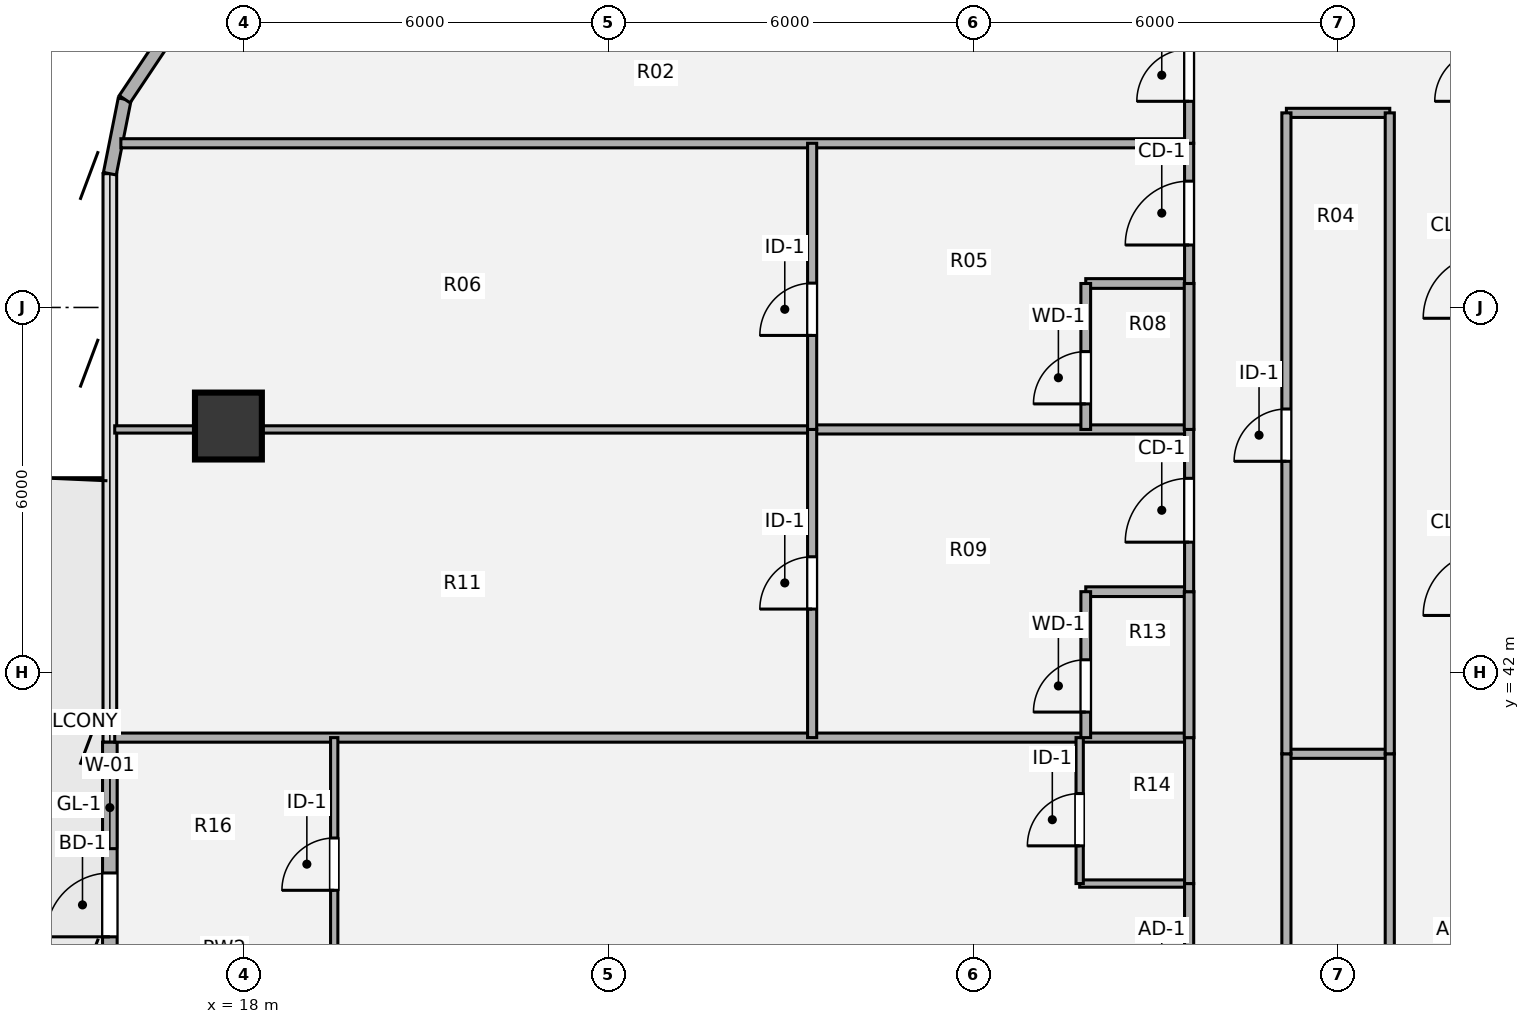
"""IFC4 building model, lengths in metres.
Left out: names, types, materials, properties, quantities, classifications, styles, units other than length and angle.
Written with IfcOpenShell. Run it as: python <this file> out.ifc"""

import sys

from ifc_helpers import new_model, si_unit, direction, frame, frame_2d, origin, origin_2d, place, context, subcontext, project, spatial, rectangle, hollow_circle, extrude, source, transform, mapped, element, fill, save


model = new_model("IFC4")
c1 = context("Model", 3, precision=1e-05, world=origin(), true_north=direction((0.0, 1.0)))
c2 = subcontext(c1, "Body", "Model", "MODEL_VIEW")
j1 = project(units=[si_unit("LENGTHUNIT", "METRE"), si_unit("PLANEANGLEUNIT", "RADIAN")], contexts=[c1])
p1 = place(None, origin())
s1 = spatial("IfcSite", under=j1, at=p1, CompositionType="ELEMENT")
p2 = place(p1, origin())
s2 = spatial("IfcBuilding", under=s1, at=p2, CompositionType="ELEMENT")
p3 = place(p2, frame((0.0, 0.0, 205.56)))
s3 = spatial("IfcBuildingStorey", under=s2, at=p3, CompositionType="ELEMENT", Elevation=205.56)
m1 = source(origin(), c2, "Body", "SweptSolid", [
    extrude(hollow_circle(Radius=0.55, WallThickness=0.04, at=origin_2d()), origin(), (0.0, 0.0, 1.0), 3.78),
])
p4 = place(p3, frame((17.75, 46.05, 0.0), z_axis=(0.0, 0.0, 1.0), x_axis=(1.0, 0.0, 0.0)))
e1 = element("IfcColumn", 1, at=p4, inside=s3, PredefinedType="COLUMN", context=c2, shape_type="MappedRepresentation", body=[
    mapped(m1, transform((0.0, 0.0, 0.0), x_axis=(1.0, 0.0, 0.0), y_axis=(0.0, 1.0, 0.0), z_axis=(0.0, 0.0, 1.0), scale=1.0)),
])
p5 = place(p3, frame((15.8, 37.25, 0.0), z_axis=(0.0, 0.0, 1.0), x_axis=(0.0, 1.0, 0.0)))
e2 = element("IfcWall", 2, at=p5, inside=s3, PredefinedType="SOLIDWALL", context=c2, shape_type="SweptSolid", body=[
    extrude(rectangle(XDim=3.6, YDim=0.24, at=frame_2d((1.8, 0.0))), origin(), (0.0, 0.0, 1.0), 3.53),
])
p6 = place(p5, frame((0.4, 0.0, 0.0)))
e3 = element("IfcOpeningElement", 3, at=p6, cuts=e2, PredefinedType="OPENING", context=c2, shape_type="SweptSolid", body=[
    extrude(rectangle(XDim=1.05, YDim=2.15, at=origin_2d()), frame((0.525, 0.13, 1.075), z_axis=(0.0, -1.0, 0.0), x_axis=(1.0, 0.0, 0.0)), (0.0, 0.0, 1.0), 0.26),
])
p7 = place(p5, frame((1.85, 0.0, 0.85)))
e4 = element("IfcOpeningElement", 4, at=p7, cuts=e2, PredefinedType="OPENING", context=c2, shape_type="SweptSolid", body=[
    extrude(rectangle(XDim=1.35, YDim=1.35, at=origin_2d()), frame((0.675, 0.13, 0.675), z_axis=(0.0, -1.0, 0.0), x_axis=(1.0, 0.0, 0.0)), (0.0, 0.0, 1.0), 0.26),
])
for number, where, z_axis, x_axis in (
    (5, (15.8, 50.2, 0.0), (0.0, 0.0, 1.0), (0.195, 0.981, 0.0)),
    (6, (16.044, 51.425, 0.0), (0.0, 0.0, 1.0), (0.556, 0.831, 0.0)),
):
    element("IfcWall", number, at=place(p3, frame(where, z_axis=z_axis, x_axis=x_axis)), inside=s3, PredefinedType="SOLIDWALL", context=c2, shape_type="SweptSolid", body=[
        extrude(rectangle(XDim=1.249, YDim=0.215, at=frame_2d((0.624, 0.0))), origin(), (0.0, 0.0, 1.0), 3.53),
    ])
p8 = place(p3, frame((31.75, 38.526, 0.0), z_axis=(0.0, 0.0, 1.0), x_axis=(1.0, 0.0, 0.0)))
e7 = element("IfcWall", 7, at=p8, inside=s3, PredefinedType="PARTITIONING", context=c2, shape_type="SweptSolid", body=[
    extrude(rectangle(XDim=1.8, YDim=0.12, at=frame_2d((0.9, 0.0))), origin(), (0.0, 0.0, 1.0), 3.259),
])
p9 = place(p3, frame((35.15, 40.66, 0.0), z_axis=(0.0, 0.0, 1.0), x_axis=(1.0, 0.0, 0.0)))
e8 = element("IfcWall", 8, at=p9, inside=s3, PredefinedType="PARTITIONING", context=c2, shape_type="SweptSolid", body=[
    extrude(rectangle(XDim=1.7, YDim=0.15, at=frame_2d((0.85, 0.0))), origin(), (0.0, 0.0, 1.0), 3.259),
])
p10 = place(p3, frame((15.88, 40.926, 0.0), z_axis=(0.0, 0.0, 1.0), x_axis=(1.0, 0.0, 0.0)))
e9 = element("IfcWall", 9, at=p10, inside=s3, PredefinedType="PARTITIONING", context=c2, shape_type="SweptSolid", body=[
    extrude(rectangle(XDim=17.67, YDim=0.15, at=frame_2d((8.835, 0.0))), origin(), (0.0, 0.0, 1.0), 2.982),
])
p11 = place(p3, frame((31.85, 43.326, 0.0), z_axis=(0.0, 0.0, 1.0), x_axis=(1.0, 0.0, 0.0)))
e10 = element("IfcWall", 10, at=p11, inside=s3, PredefinedType="PLUMBINGWALL", context=c2, shape_type="SweptSolid", body=[
    extrude(rectangle(XDim=1.7, YDim=0.16, at=frame_2d((0.85, 0.0))), origin(), (0.0, 0.0, 1.0), 3.259),
])
p12 = place(p3, frame((15.88, 45.994, 0.0), z_axis=(0.0, 0.0, 1.0), x_axis=(1.0, 0.0, 0.0)))
e11 = element("IfcWall", 11, at=p12, inside=s3, PredefinedType="PARTITIONING", context=c2, shape_type="SweptSolid", body=[
    extrude(rectangle(XDim=11.47, YDim=0.12, at=frame_2d((5.735, 0.0))), origin(), (0.0, 0.0, 1.0), 2.903),
])
p13 = place(p3, frame((27.35, 45.994, 0.0), z_axis=(0.0, 0.0, 1.0), x_axis=(1.0, 0.0, 0.0)))
e12 = element("IfcWall", 12, at=p13, inside=s3, PredefinedType="PARTITIONING", context=c2, shape_type="SweptSolid", body=[
    extrude(rectangle(XDim=6.2, YDim=0.15, at=frame_2d((3.1, 0.0))), origin(), (0.0, 0.0, 1.0), 2.903),
])
p14 = place(p3, frame((31.85, 48.394, 0.0), z_axis=(0.0, 0.0, 1.0), x_axis=(1.0, 0.0, 0.0)))
e13 = element("IfcWall", 13, at=p14, inside=s3, PredefinedType="PLUMBINGWALL", context=c2, shape_type="SweptSolid", body=[
    extrude(rectangle(XDim=1.7, YDim=0.16, at=frame_2d((0.85, 0.0))), origin(), (0.0, 0.0, 1.0), 3.259),
])
p15 = place(p3, frame((15.981, 50.7, 0.0), z_axis=(0.0, 0.0, 1.0), x_axis=(1.0, 0.0, 0.0)))
e14 = element("IfcWall", 14, at=p15, inside=s3, PredefinedType="PARTITIONING", context=c2, shape_type="SweptSolid", body=[
    extrude(rectangle(XDim=17.569, YDim=0.15, at=frame_2d((8.785, 0.0))), origin(), (0.0, 0.0, 1.0), 3.308),
])
p16 = place(p3, frame((35.15, 51.2, 0.0), z_axis=(0.0, 0.0, 1.0), x_axis=(1.0, 0.0, 0.0)))
e15 = element("IfcWall", 15, at=p16, inside=s3, PredefinedType="PARTITIONING", context=c2, shape_type="SweptSolid", body=[
    extrude(rectangle(XDim=1.7, YDim=0.15, at=frame_2d((0.85, 0.0))), origin(), (0.0, 0.0, 1.0), 3.308),
])
p17 = place(p3, frame((19.49, 36.763, 0.0), z_axis=(0.0, 0.0, 1.0), x_axis=(0.0, 1.0, 0.0)))
e16 = element("IfcWall", 16, at=p17, inside=s3, PredefinedType="PARTITIONING", context=c2, shape_type="SweptSolid", body=[
    extrude(rectangle(XDim=4.163, YDim=0.12, at=frame_2d((2.082, 0.0))), origin(), (0.0, 0.0, 1.0), 3.5),
])
p18 = place(p17, frame((1.652, 0.0, 0.0)))
e17 = element("IfcOpeningElement", 17, at=p18, cuts=e16, PredefinedType="OPENING", context=c2, shape_type="SweptSolid", body=[
    extrude(rectangle(XDim=0.86, YDim=2.1, at=origin_2d()), frame((0.43, 0.07, 1.05), z_axis=(0.0, -1.0, 0.0), x_axis=(1.0, 0.0, 0.0)), (0.0, 0.0, 1.0), 0.14),
])
p19 = place(p3, frame((27.35, 40.926, 0.0), z_axis=(0.0, 0.0, 1.0), x_axis=(0.0, 1.0, 0.0)))
e18 = element("IfcWall", 18, at=p19, inside=s3, PredefinedType="PARTITIONING", context=c2, shape_type="SweptSolid", body=[
    extrude(rectangle(XDim=5.068, YDim=0.15, at=frame_2d((2.534, 0.0))), origin(), (0.0, 0.0, 1.0), 3.5),
])
p20 = place(p19, frame((2.114, 0.0, 0.0)))
e19 = element("IfcOpeningElement", 19, at=p20, cuts=e18, PredefinedType="OPENING", context=c2, shape_type="SweptSolid", body=[
    extrude(rectangle(XDim=0.86, YDim=2.1, at=origin_2d()), frame((0.43, 0.085, 1.05), z_axis=(0.0, -1.0, 0.0), x_axis=(1.0, 0.0, 0.0)), (0.0, 0.0, 1.0), 0.17),
])
p21 = place(p3, frame((27.35, 45.994, 0.0), z_axis=(0.0, 0.0, 1.0), x_axis=(0.0, 1.0, 0.0)))
e20 = element("IfcWall", 20, at=p21, inside=s3, PredefinedType="PARTITIONING", context=c2, shape_type="SweptSolid", body=[
    extrude(rectangle(XDim=4.706, YDim=0.15, at=frame_2d((2.353, 0.0))), origin(), (0.0, 0.0, 1.0), 3.5),
])
p22 = place(p21, frame((1.546, 0.0, 0.0)))
e21 = element("IfcOpeningElement", 21, at=p22, cuts=e20, PredefinedType="OPENING", context=c2, shape_type="SweptSolid", body=[
    extrude(rectangle(XDim=0.86, YDim=2.1, at=origin_2d()), frame((0.43, 0.085, 1.05), z_axis=(0.0, -1.0, 0.0), x_axis=(1.0, 0.0, 0.0)), (0.0, 0.0, 1.0), 0.17),
])
p23 = place(p3, frame((31.75, 38.526, 0.0), z_axis=(0.0, 0.0, 1.0), x_axis=(0.0, 1.0, 0.0)))
e22 = element("IfcWall", 22, at=p23, inside=s3, PredefinedType="PARTITIONING", context=c2, shape_type="SweptSolid", body=[
    extrude(rectangle(XDim=2.4, YDim=0.12, at=frame_2d((1.2, 0.0))), origin(), (0.0, 0.0, 1.0), 3.5),
])
p24 = place(p23, frame((0.62, 0.0, 0.0)))
e23 = element("IfcOpeningElement", 23, at=p24, cuts=e22, PredefinedType="OPENING", context=c2, shape_type="SweptSolid", body=[
    extrude(rectangle(XDim=0.86, YDim=2.1, at=origin_2d()), frame((0.43, 0.07, 1.05), z_axis=(0.0, -1.0, 0.0), x_axis=(1.0, 0.0, 0.0)), (0.0, 0.0, 1.0), 0.14),
])
p25 = place(p3, frame((31.85, 40.926, 0.0), z_axis=(0.0, 0.0, 1.0), x_axis=(0.0, 1.0, 0.0)))
e24 = element("IfcWall", 24, at=p25, inside=s3, PredefinedType="PLUMBINGWALL", context=c2, shape_type="SweptSolid", body=[
    extrude(rectangle(XDim=2.4, YDim=0.16, at=frame_2d((1.2, 0.0))), origin(), (0.0, 0.0, 1.0), 3.5),
])
p26 = place(p25, frame((0.42, 0.0, 0.0)))
e25 = element("IfcOpeningElement", 25, at=p26, cuts=e24, PredefinedType="OPENING", context=c2, shape_type="SweptSolid", body=[
    extrude(rectangle(XDim=0.86, YDim=2.1, at=origin_2d()), frame((0.43, 0.09, 1.05), z_axis=(0.0, -1.0, 0.0), x_axis=(1.0, 0.0, 0.0)), (0.0, 0.0, 1.0), 0.18),
])
p27 = place(p3, frame((31.85, 45.994, 0.0), z_axis=(0.0, 0.0, 1.0), x_axis=(0.0, 1.0, 0.0)))
e26 = element("IfcWall", 26, at=p27, inside=s3, PredefinedType="PLUMBINGWALL", context=c2, shape_type="SweptSolid", body=[
    extrude(rectangle(XDim=2.4, YDim=0.16, at=frame_2d((1.2, 0.0))), origin(), (0.0, 0.0, 1.0), 3.5),
])
p28 = place(p27, frame((0.42, 0.0, 0.0)))
e27 = element("IfcOpeningElement", 27, at=p28, cuts=e26, PredefinedType="OPENING", context=c2, shape_type="SweptSolid", body=[
    extrude(rectangle(XDim=0.86, YDim=2.1, at=origin_2d()), frame((0.43, 0.09, 1.05), z_axis=(0.0, -1.0, 0.0), x_axis=(1.0, 0.0, 0.0)), (0.0, 0.0, 1.0), 0.18),
])
p29 = place(p3, frame((33.55, 35.0, 0.0), z_axis=(0.0, 0.0, 1.0), x_axis=(0.0, 1.0, 0.0)))
e28 = element("IfcWall", 28, at=p29, inside=s3, PredefinedType="PARTITIONING", context=c2, shape_type="SweptSolid", body=[
    extrude(rectangle(XDim=3.526, YDim=0.15, at=frame_2d((1.763, 0.0))), origin(), (0.0, 0.0, 1.0), 3.5),
])
p30 = place(p29, frame((1.303, 0.0, 0.0)))
e29 = element("IfcOpeningElement", 29, at=p30, cuts=e28, PredefinedType="OPENING", context=c2, shape_type="SweptSolid", body=[
    extrude(rectangle(XDim=0.92, YDim=2.1, at=origin_2d()), frame((0.46, 0.085, 1.05), z_axis=(0.0, -1.0, 0.0), x_axis=(1.0, 0.0, 0.0)), (0.0, 0.0, 1.0), 0.17),
])
p31 = place(p3, frame((33.55, 38.526, 0.0), z_axis=(0.0, 0.0, 1.0), x_axis=(0.0, 1.0, 0.0)))
e30 = element("IfcWall", 30, at=p31, inside=s3, PredefinedType="PARTITIONING", context=c2, shape_type="SweptSolid", body=[
    extrude(rectangle(XDim=2.4, YDim=0.15, at=frame_2d((1.2, 0.0))), origin(), (0.0, 0.0, 1.0), 3.5),
])
p32 = place(p3, frame((33.55, 40.926, 0.0), z_axis=(0.0, 0.0, 1.0), x_axis=(0.0, 1.0, 0.0)))
e31 = element("IfcWall", 31, at=p32, inside=s3, PredefinedType="PLUMBINGWALL", context=c2, shape_type="SweptSolid", body=[
    extrude(rectangle(XDim=2.4, YDim=0.16, at=frame_2d((1.2, 0.0))), origin(), (0.0, 0.0, 1.0), 3.5),
])
p33 = place(p3, frame((33.55, 43.326, 0.0), z_axis=(0.0, 0.0, 1.0), x_axis=(0.0, 1.0, 0.0)))
e32 = element("IfcWall", 32, at=p33, inside=s3, PredefinedType="PARTITIONING", context=c2, shape_type="SweptSolid", body=[
    extrude(rectangle(XDim=2.668, YDim=0.15, at=frame_2d((1.334, 0.0))), origin(), (0.0, 0.0, 1.0), 3.5),
])
p34 = place(p33, frame((0.814, 0.0, 0.0)))
e33 = element("IfcOpeningElement", 33, at=p34, cuts=e32, PredefinedType="OPENING", context=c2, shape_type="SweptSolid", body=[
    extrude(rectangle(XDim=1.05, YDim=2.1, at=origin_2d()), frame((0.525, 0.085, 1.05), z_axis=(0.0, -1.0, 0.0), x_axis=(1.0, 0.0, 0.0)), (0.0, 0.0, 1.0), 0.17),
])
p35 = place(p3, frame((33.55, 45.994, 0.0), z_axis=(0.0, 0.0, 1.0), x_axis=(0.0, 1.0, 0.0)))
e34 = element("IfcWall", 34, at=p35, inside=s3, PredefinedType="PLUMBINGWALL", context=c2, shape_type="SweptSolid", body=[
    extrude(rectangle(XDim=2.4, YDim=0.16, at=frame_2d((1.2, 0.0))), origin(), (0.0, 0.0, 1.0), 3.5),
])
p36 = place(p3, frame((33.55, 48.394, 0.0), z_axis=(0.0, 0.0, 1.0), x_axis=(0.0, 1.0, 0.0)))
e35 = element("IfcWall", 35, at=p36, inside=s3, PredefinedType="PARTITIONING", context=c2, shape_type="SweptSolid", body=[
    extrude(rectangle(XDim=2.306, YDim=0.15, at=frame_2d((1.153, 0.0))), origin(), (0.0, 0.0, 1.0), 3.5),
])
p37 = place(p36, frame((0.633, 0.0, 0.0)))
e36 = element("IfcOpeningElement", 36, at=p37, cuts=e35, PredefinedType="OPENING", context=c2, shape_type="SweptSolid", body=[
    extrude(rectangle(XDim=1.05, YDim=2.1, at=origin_2d()), frame((0.525, 0.085, 1.05), z_axis=(0.0, -1.0, 0.0), x_axis=(1.0, 0.0, 0.0)), (0.0, 0.0, 1.0), 0.17),
])
p38 = place(p3, frame((33.55, 50.7, 0.0), z_axis=(0.0, 0.0, 1.0), x_axis=(0.0, 1.0, 0.0)))
e37 = element("IfcWall", 37, at=p38, inside=s3, PredefinedType="PARTITIONING", context=c2, shape_type="SweptSolid", body=[
    extrude(rectangle(XDim=2.3, YDim=0.15, at=frame_2d((1.15, 0.0))), origin(), (0.0, 0.0, 1.0), 3.5),
])
p39 = place(p38, frame((0.69, 0.0, 0.0)))
e38 = element("IfcOpeningElement", 38, at=p39, cuts=e37, PredefinedType="OPENING", context=c2, shape_type="SweptSolid", body=[
    extrude(rectangle(XDim=0.86, YDim=2.1, at=origin_2d()), frame((0.43, 0.085, 1.05), z_axis=(0.0, -1.0, 0.0), x_axis=(1.0, 0.0, 0.0)), (0.0, 0.0, 1.0), 0.17),
])
p40 = place(p3, frame((35.15, 25.2, 0.0), z_axis=(0.0, 0.0, 1.0), x_axis=(0.0, 1.0, 0.0)))
e39 = element("IfcWall", 39, at=p40, inside=s3, PredefinedType="PARTITIONING", context=c2, shape_type="SweptSolid", body=[
    extrude(rectangle(XDim=15.46, YDim=0.15, at=frame_2d((7.73, 0.0))), origin(), (0.0, 0.0, 1.0), 3.5),
])
p41 = place(p3, frame((35.15, 40.66, 0.0), z_axis=(0.0, 0.0, 1.0), x_axis=(0.0, 1.0, 0.0)))
e40 = element("IfcWall", 40, at=p41, inside=s3, PredefinedType="PARTITIONING", context=c2, shape_type="SweptSolid", body=[
    extrude(rectangle(XDim=10.54, YDim=0.15, at=frame_2d((5.27, 0.0))), origin(), (0.0, 0.0, 1.0), 3.5),
])
p42 = place(p41, frame((4.81, 0.0, 0.0)))
e41 = element("IfcOpeningElement", 41, at=p42, cuts=e40, PredefinedType="OPENING", context=c2, shape_type="SweptSolid", body=[
    extrude(rectangle(XDim=0.86, YDim=2.1, at=origin_2d()), frame((0.43, 0.085, 1.05), z_axis=(0.0, -1.0, 0.0), x_axis=(1.0, 0.0, 0.0)), (0.0, 0.0, 1.0), 0.17),
])
p43 = place(p3, frame((36.85, 25.2, 0.0), z_axis=(0.0, 0.0, 1.0), x_axis=(0.0, 1.0, 0.0)))
e42 = element("IfcWall", 42, at=p43, inside=s3, PredefinedType="PARTITIONING", context=c2, shape_type="SweptSolid", body=[
    extrude(rectangle(XDim=15.46, YDim=0.15, at=frame_2d((7.73, 0.0))), origin(), (0.0, 0.0, 1.0), 3.5),
])
p44 = place(p43, frame((7.205, 0.0, 0.0)))
e43 = element("IfcOpeningElement", 43, at=p44, cuts=e42, PredefinedType="OPENING", context=c2, shape_type="SweptSolid", body=[
    extrude(rectangle(XDim=1.05, YDim=2.1, at=origin_2d()), frame((0.525, 0.085, 1.05), z_axis=(0.0, -1.0, 0.0), x_axis=(1.0, 0.0, 0.0)), (0.0, 0.0, 1.0), 0.17),
])
p45 = place(p3, frame((36.85, 40.66, 0.0), z_axis=(0.0, 0.0, 1.0), x_axis=(0.0, 1.0, 0.0)))
e44 = element("IfcWall", 44, at=p45, inside=s3, PredefinedType="PARTITIONING", context=c2, shape_type="SweptSolid", body=[
    extrude(rectangle(XDim=10.54, YDim=0.15, at=frame_2d((5.27, 0.0))), origin(), (0.0, 0.0, 1.0), 3.5),
])
m2 = source(origin(), c2, "Body", "SweptSolid", [
    extrude(rectangle(XDim=1.05, YDim=2.15, at=origin_2d()), frame((0.525, 0.025, 1.075), z_axis=(0.0, -1.0, 0.0), x_axis=(1.0, 0.0, 0.0)), (0.0, 0.0, 1.0), 0.05),
])
p46 = place(p6, origin())
e45 = element("IfcDoor", 45, at=p46, inside=s3, OperationType="SINGLE_SWING_LEFT", PredefinedType="DOOR", context=c2, shape_type="MappedRepresentation", body=[
    mapped(m2, transform((0.0, 0.0, 0.0), x_axis=(1.0, 0.0, 0.0), y_axis=(0.0, 1.0, 0.0), z_axis=(0.0, 0.0, 1.0), scale=1.0)),
])
fill(e3, e45)
m3 = source(origin(), c2, "Body", "SweptSolid", [
    extrude(rectangle(XDim=1.35, YDim=1.35, at=origin_2d()), frame((0.675, 0.03, 0.675), z_axis=(0.0, -1.0, 0.0), x_axis=(1.0, 0.0, 0.0)), (0.0, 0.0, 1.0), 0.06),
])
p47 = place(p7, origin())
e46 = element("IfcWindow", 46, at=p47, inside=s3, PartitioningType="SINGLE_PANEL", PredefinedType="WINDOW", context=c2, shape_type="MappedRepresentation", body=[
    mapped(m3, transform((0.0, 0.0, 0.0), x_axis=(1.0, 0.0, 0.0), y_axis=(0.0, 1.0, 0.0), z_axis=(0.0, 0.0, 1.0), scale=1.0)),
])
fill(e4, e46)
m4 = source(origin(), c2, "Body", "SweptSolid", [
    extrude(rectangle(XDim=0.86, YDim=2.1, at=origin_2d()), frame((0.43, 0.025, 1.05), z_axis=(0.0, -1.0, 0.0), x_axis=(1.0, 0.0, 0.0)), (0.0, 0.0, 1.0), 0.05),
])
p48 = place(p18, origin())
e47 = element("IfcDoor", 47, at=p48, inside=s3, OperationType="SINGLE_SWING_LEFT", PredefinedType="DOOR", context=c2, shape_type="MappedRepresentation", body=[
    mapped(m4, transform((0.0, 0.0, 0.0), x_axis=(1.0, 0.0, 0.0), y_axis=(0.0, 1.0, 0.0), z_axis=(0.0, 0.0, 1.0), scale=1.0)),
])
fill(e17, e47)
p49 = place(p20, origin())
e48 = element("IfcDoor", 48, at=p49, inside=s3, OperationType="SINGLE_SWING_LEFT", PredefinedType="DOOR", context=c2, shape_type="MappedRepresentation", body=[
    mapped(m4, transform((0.0, 0.0, 0.0), x_axis=(1.0, 0.0, 0.0), y_axis=(0.0, 1.0, 0.0), z_axis=(0.0, 0.0, 1.0), scale=1.0)),
])
fill(e19, e48)
p50 = place(p22, origin())
e49 = element("IfcDoor", 49, at=p50, inside=s3, OperationType="SINGLE_SWING_LEFT", PredefinedType="DOOR", context=c2, shape_type="MappedRepresentation", body=[
    mapped(m4, transform((0.0, 0.0, 0.0), x_axis=(1.0, 0.0, 0.0), y_axis=(0.0, 1.0, 0.0), z_axis=(0.0, 0.0, 1.0), scale=1.0)),
])
fill(e21, e49)
p51 = place(p24, origin())
e50 = element("IfcDoor", 50, at=p51, inside=s3, OperationType="SINGLE_SWING_LEFT", PredefinedType="DOOR", context=c2, shape_type="MappedRepresentation", body=[
    mapped(m4, transform((0.0, 0.0, 0.0), x_axis=(1.0, 0.0, 0.0), y_axis=(0.0, 1.0, 0.0), z_axis=(0.0, 0.0, 1.0), scale=1.0)),
])
fill(e23, e50)
m5 = source(origin(), c2, "Body", "SweptSolid", [
    extrude(rectangle(XDim=0.86, YDim=2.1, at=origin_2d()), frame((0.43, 0.025, 1.05), z_axis=(0.0, -1.0, 0.0), x_axis=(1.0, 0.0, 0.0)), (0.0, 0.0, 1.0), 0.05),
])
p52 = place(p26, origin())
e51 = element("IfcDoor", 51, at=p52, inside=s3, OperationType="SINGLE_SWING_LEFT", PredefinedType="DOOR", context=c2, shape_type="MappedRepresentation", body=[
    mapped(m5, transform((0.0, 0.0, 0.0), x_axis=(1.0, 0.0, 0.0), y_axis=(0.0, 1.0, 0.0), z_axis=(0.0, 0.0, 1.0), scale=1.0)),
])
fill(e25, e51)
p53 = place(p28, origin())
e52 = element("IfcDoor", 52, at=p53, inside=s3, OperationType="SINGLE_SWING_LEFT", PredefinedType="DOOR", context=c2, shape_type="MappedRepresentation", body=[
    mapped(m5, transform((0.0, 0.0, 0.0), x_axis=(1.0, 0.0, 0.0), y_axis=(0.0, 1.0, 0.0), z_axis=(0.0, 0.0, 1.0), scale=1.0)),
])
fill(e27, e52)
m6 = source(origin(), c2, "Body", "SweptSolid", [
    extrude(rectangle(XDim=1.05, YDim=2.1, at=origin_2d()), frame((0.525, 0.025, 1.05), z_axis=(0.0, -1.0, 0.0), x_axis=(1.0, 0.0, 0.0)), (0.0, 0.0, 1.0), 0.05),
])
p54 = place(p34, origin())
e53 = element("IfcDoor", 53, at=p54, inside=s3, OperationType="SINGLE_SWING_LEFT", PredefinedType="DOOR", context=c2, shape_type="MappedRepresentation", body=[
    mapped(m6, transform((0.0, 0.0, 0.0), x_axis=(1.0, 0.0, 0.0), y_axis=(0.0, 1.0, 0.0), z_axis=(0.0, 0.0, 1.0), scale=1.0)),
])
fill(e33, e53)
p55 = place(p37, origin())
e54 = element("IfcDoor", 54, at=p55, inside=s3, OperationType="SINGLE_SWING_LEFT", PredefinedType="DOOR", context=c2, shape_type="MappedRepresentation", body=[
    mapped(m6, transform((0.0, 0.0, 0.0), x_axis=(1.0, 0.0, 0.0), y_axis=(0.0, 1.0, 0.0), z_axis=(0.0, 0.0, 1.0), scale=1.0)),
])
fill(e36, e54)
p56 = place(p39, origin())
e55 = element("IfcDoor", 55, at=p56, inside=s3, OperationType="SINGLE_SWING_LEFT", PredefinedType="DOOR", context=c2, shape_type="MappedRepresentation", body=[
    mapped(m4, transform((0.0, 0.0, 0.0), x_axis=(1.0, 0.0, 0.0), y_axis=(0.0, 1.0, 0.0), z_axis=(0.0, 0.0, 1.0), scale=1.0)),
])
fill(e38, e55)
p57 = place(p42, origin())
e56 = element("IfcDoor", 56, at=p57, inside=s3, OperationType="SINGLE_SWING_LEFT", PredefinedType="DOOR", context=c2, shape_type="MappedRepresentation", body=[
    mapped(m4, transform((0.0, 0.0, 0.0), x_axis=(1.0, 0.0, 0.0), y_axis=(0.0, 1.0, 0.0), z_axis=(0.0, 0.0, 1.0), scale=1.0)),
])
fill(e41, e56)
save(model, sys.argv[1])
